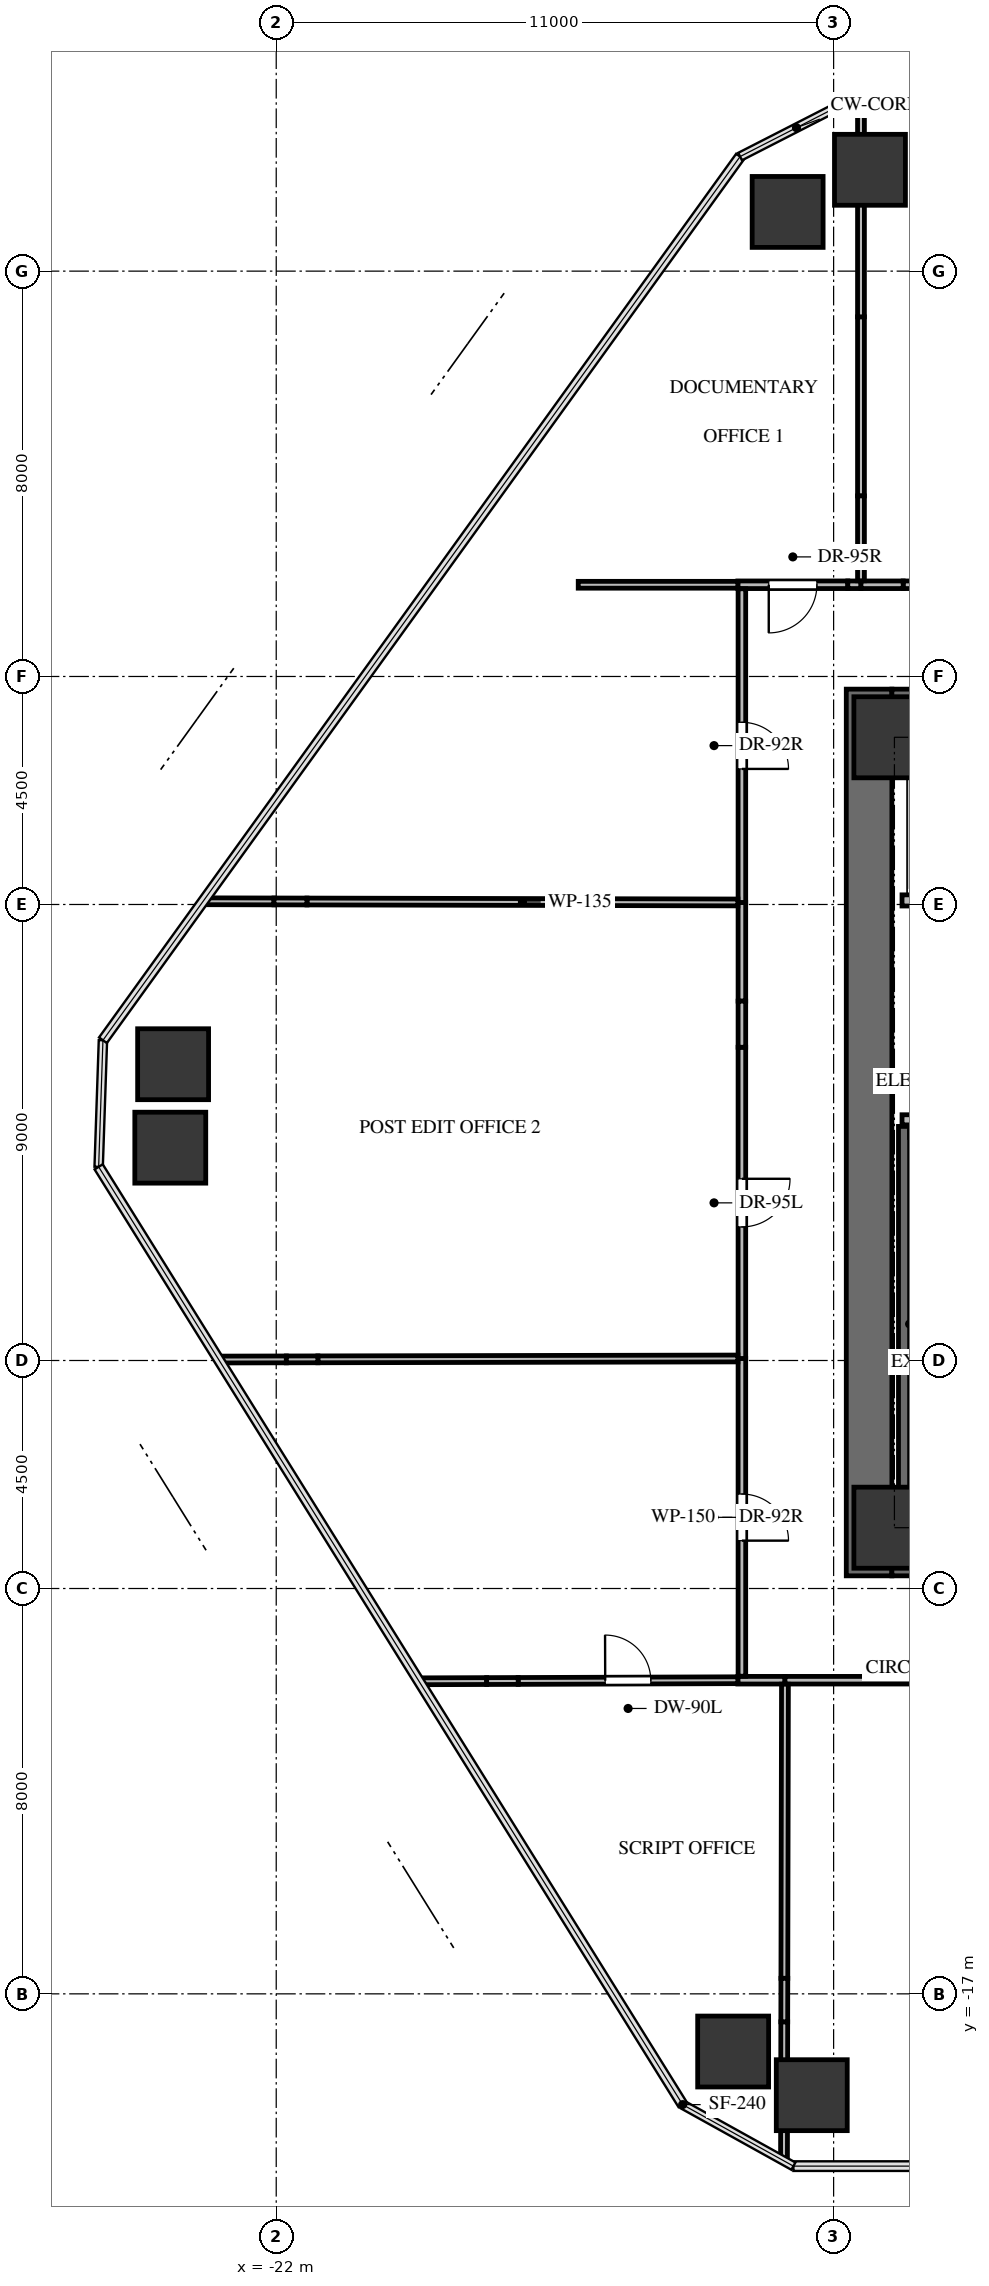
"""IFC4 building model, lengths in metres.
Left out: names, types, materials, properties, quantities, classifications, styles, units other than length and angle.
Written with IfcOpenShell. Run it as: python <this file> out.ifc"""

import sys

from ifc_helpers import new_model, si_unit, direction, frame, frame_2d, origin, origin_2d, place, context, subcontext, project, spatial, rectangle, extrude, source, transform, mapped, element, fill, save


model = new_model("IFC4")
c1 = context("Model", 3, precision=1e-05, world=origin(), true_north=direction((0.0, 1.0)))
c2 = subcontext(c1, "Body", "Model", "MODEL_VIEW")
j1 = project(units=[si_unit("LENGTHUNIT", "METRE"), si_unit("PLANEANGLEUNIT", "RADIAN")], contexts=[c1])
p1 = place(None, origin())
s1 = spatial("IfcSite", under=j1, at=p1, CompositionType="ELEMENT")
p2 = place(p1, origin())
s2 = spatial("IfcBuilding", under=s1, at=p2, CompositionType="ELEMENT")
p3 = place(p2, frame((0.0, 0.0, 75.3)))
s3 = spatial("IfcBuildingStorey", under=s2, at=p3, CompositionType="ELEMENT", Elevation=75.3)
p4 = place(p3, frame((-10.3, -8.75, 0.0), z_axis=(0.0, 0.0, 1.0), x_axis=(0.0, 1.0, 0.0)))
e1 = element("IfcWall", 1, at=p4, inside=s3, PredefinedType="SHEAR", context=c2, shape_type="SweptSolid", body=[
    extrude(rectangle(XDim=17.5, YDim=0.9, at=frame_2d((8.75, 0.0))), origin(), (0.0, 0.0, 1.0), 3.0),
])
p5 = place(p3, frame((-9.85, -8.3, 0.0), z_axis=(0.0, 0.0, 1.0), x_axis=(1.0, 0.0, 0.0)))
e2 = element("IfcWall", 2, at=p5, inside=s3, PredefinedType="SHEAR", context=c2, shape_type="SweptSolid", body=[
    extrude(rectangle(XDim=7.75, YDim=0.9, at=frame_2d((3.875, 0.0))), origin(), (0.0, 0.0, 1.0), 3.0),
])
p6 = place(p3, frame((-9.85, 8.3, 0.0), z_axis=(0.0, 0.0, 1.0), x_axis=(1.0, 0.0, 0.0)))
e3 = element("IfcWall", 3, at=p6, inside=s3, PredefinedType="SHEAR", context=c2, shape_type="SweptSolid", body=[
    extrude(rectangle(XDim=19.7, YDim=0.9, at=frame_2d((9.85, 0.0))), origin(), (0.0, 0.0, 1.0), 3.0),
])
p7 = place(p3, frame((-9.61, 0.12, -0.24), z_axis=(0.0, 0.0, 1.0), x_axis=(0.0, -1.0, 0.0)))
e4 = element("IfcWall", 4, at=p7, inside=s3, PredefinedType="SHEAR", context=c2, shape_type="SweptSolid", body=[
    extrude(rectangle(XDim=7.89, YDim=0.22, at=frame_2d((3.945, 0.0))), origin(), (0.0, 0.0, 1.0), 3.0),
])
m1 = source(origin(), c2, "Body", "SweptSolid", [
    extrude(rectangle(XDim=1.6, YDim=1.6, at=origin_2d()), origin(), (0.0, 0.0, 1.0), 3.0),
])
for number, where, z_axis, x_axis in (
    (5, (-9.8, -7.8, -0.24), (0.0, 0.0, 1.0), (1.0, 0.0, 0.0)),
    (6, (-9.8, 7.8, -0.24), (0.0, 0.0, 1.0), (1.0, 0.0, 0.0)),
):
    element("IfcColumn", number, at=place(p3, frame(where, z_axis=z_axis, x_axis=x_axis)), inside=s3, PredefinedType="COLUMN", context=c2, shape_type="MappedRepresentation", body=[
        mapped(m1, transform((0.0, 0.0, 0.0), x_axis=(1.0, 0.0, 0.0), y_axis=(0.0, 1.0, 0.0), z_axis=(0.0, 0.0, 1.0), scale=1.0)),
    ])
m2 = source(origin(), c2, "Body", "SweptSolid", [
    extrude(rectangle(XDim=1.4, YDim=1.4, at=origin_2d()), origin(), (0.0, 0.0, 1.0), 3.0),
])
for number, where, z_axis, x_axis in (
    (7, (-12.983, -18.138, -0.24), (0.0, 0.0, 1.0), (1.0, 0.0, 0.0)),
    (8, (-24.091, -0.3, -0.24), (0.0, 0.0, 1.0), (1.0, 0.0, 0.0)),
    (9, (-24.035, 1.347, -0.24), (0.0, 0.0, 1.0), (1.0, 0.0, 0.0)),
    (10, (-11.907, 18.168, -0.24), (0.0, 0.0, 1.0), (1.0, 0.0, 0.0)),
    (11, (-10.283, 19.0, -0.24), (0.0, 0.0, 1.0), (1.0, 0.0, 0.0)),
    (12, (-11.431, -19.0, -0.24), (0.0, 0.0, 1.0), (1.0, 0.0, 0.0)),
):
    element("IfcColumn", number, at=place(p3, frame(where, z_axis=z_axis, x_axis=x_axis)), inside=s3, PredefinedType="COLUMN", context=c2, shape_type="MappedRepresentation", body=[
        mapped(m2, transform((0.0, 0.0, 0.0), x_axis=(1.0, 0.0, 0.0), y_axis=(0.0, 1.0, 0.0), z_axis=(0.0, 0.0, 1.0), scale=1.0)),
    ])
p8 = place(p3, frame((-9.65, 4.58, 0.0), z_axis=(0.0, 0.0, 1.0), x_axis=(1.0, 0.0, 0.0)))
e13 = element("IfcWall", 13, at=p8, inside=s3, PredefinedType="SOLIDWALL", context=c2, shape_type="SweptSolid", body=[
    extrude(rectangle(XDim=4.175, YDim=0.22, at=frame_2d((2.087, 0.0))), origin(), (0.0, 0.0, 1.0), 2.745),
])
p9 = place(p8, frame((0.4, 0.0, 0.0)))
e14 = element("IfcOpeningElement", 14, at=p9, cuts=e13, PredefinedType="OPENING", context=c2, shape_type="SweptSolid", body=[
    extrude(rectangle(XDim=1.2, YDim=2.15, at=frame_2d((0.6, 1.075))), frame((0.0, 0.12, 0.0), z_axis=(0.0, -1.0, 0.0), x_axis=(1.0, 0.0, 0.0)), (0.0, 0.0, 1.0), 0.24),
])
p10 = place(p8, frame((2.4, 0.0, 0.0)))
e15 = element("IfcOpeningElement", 15, at=p10, cuts=e13, PredefinedType="OPENING", context=c2, shape_type="SweptSolid", body=[
    extrude(rectangle(XDim=1.2, YDim=2.15, at=frame_2d((0.6, 1.075))), frame((0.0, 0.12, 0.0), z_axis=(0.0, -1.0, 0.0), x_axis=(1.0, 0.0, 0.0)), (0.0, 0.0, 1.0), 0.24),
])
p11 = place(p3, frame((-9.65, 0.25, 0.0), z_axis=(0.0, 0.0, 1.0), x_axis=(1.0, 0.0, 0.0)))
e16 = element("IfcWall", 16, at=p11, inside=s3, PredefinedType="SOLIDWALL", context=c2, shape_type="SweptSolid", body=[
    extrude(rectangle(XDim=4.27, YDim=0.2, at=frame_2d((2.135, 0.0))), origin(), (0.0, 0.0, 1.0), 2.745),
])
p12 = place(p3, frame((-10.72, 10.81, 0.0), z_axis=(0.0, 0.0, 1.0), x_axis=(-1.0, 0.0, 0.0)))
e17 = element("IfcWall", 17, at=p12, inside=s3, PredefinedType="PARTITIONING", context=c2, shape_type="SweptSolid", body=[
    extrude(rectangle(XDim=2.17, YDim=0.15, at=frame_2d((1.085, 0.0))), origin(), (0.0, 0.0, 1.0), 2.745),
])
p13 = place(p12, frame((0.61, 0.0, 0.0)))
e18 = element("IfcOpeningElement", 18, at=p13, cuts=e17, PredefinedType="OPENING", context=c2, shape_type="SweptSolid", body=[
    extrude(rectangle(XDim=0.95, YDim=2.1, at=frame_2d((0.475, 1.05))), frame((0.0, 0.085, 0.0), z_axis=(0.0, -1.0, 0.0), x_axis=(1.0, 0.0, 0.0)), (0.0, 0.0, 1.0), 0.17),
])
p14 = place(p3, frame((-10.46, 10.81, 0.0), z_axis=(0.0, 0.0, 1.0), x_axis=(-1.0, 0.0, 0.0)))
e19 = element("IfcWall", 19, at=p14, inside=s3, PredefinedType="PARTITIONING", context=c2, shape_type="SweptSolid", body=[
    extrude(rectangle(XDim=0.26, YDim=0.15, at=frame_2d((0.13, 0.0))), origin(), (0.0, 0.0, 1.0), 1.83),
])
p15 = place(p3, frame((-4.96, 10.81, 0.0), z_axis=(0.0, 0.0, 1.0), x_axis=(-1.0, 0.0, 0.0)))
e20 = element("IfcWall", 20, at=p15, inside=s3, PredefinedType="PARTITIONING", context=c2, shape_type="SweptSolid", body=[
    extrude(rectangle(XDim=4.667, YDim=0.15, at=frame_2d((2.334, 0.0))), origin(), (0.0, 0.0, 1.0), 2.298),
])
p16 = place(p15, frame((1.874, 0.0, 0.0)))
e21 = element("IfcOpeningElement", 21, at=p16, cuts=e20, PredefinedType="OPENING", context=c2, shape_type="SweptSolid", body=[
    extrude(rectangle(XDim=0.92, YDim=2.1, at=frame_2d((0.46, 1.05))), frame((0.0, 0.085, 0.0), z_axis=(0.0, -1.0, 0.0), x_axis=(1.0, 0.0, 0.0)), (0.0, 0.0, 1.0), 0.17),
])
p17 = place(p3, frame((-9.627, 10.81, 0.0), z_axis=(0.0, 0.0, 1.0), x_axis=(-1.0, 0.0, 0.0)))
e22 = element("IfcWall", 22, at=p17, inside=s3, PredefinedType="PARTITIONING", context=c2, shape_type="SweptSolid", body=[
    extrude(rectangle(XDim=0.833, YDim=0.15, at=frame_2d((0.416, 0.0))), origin(), (0.0, 0.0, 1.0), 1.83),
])
p18 = place(p3, frame((-12.89, -10.81, 0.0), z_axis=(0.0, 0.0, 1.0), x_axis=(1.0, 0.0, 0.0)))
e23 = element("IfcWall", 23, at=p18, inside=s3, PredefinedType="PARTITIONING", context=c2, shape_type="SweptSolid", body=[
    extrude(rectangle(XDim=0.93, YDim=0.15, at=frame_2d((0.465, 0.0))), origin(), (0.0, 0.0, 1.0), 2.745),
])
p19 = place(p3, frame((-11.96, -10.81, 0.0), z_axis=(0.0, 0.0, 1.0), x_axis=(1.0, 0.0, 0.0)))
e24 = element("IfcWall", 24, at=p19, inside=s3, PredefinedType="PARTITIONING", context=c2, shape_type="SweptSolid", body=[
    extrude(rectangle(XDim=5.838, YDim=0.15, at=frame_2d((2.919, 0.0))), origin(), (0.0, 0.0, 1.0), 1.83),
])
p20 = place(p3, frame((-12.81, -4.46, 0.0), z_axis=(0.0, 0.0, 1.0), x_axis=(0.0, -1.0, 0.0)))
e25 = element("IfcWall", 25, at=p20, inside=s3, PredefinedType="PARTITIONING", context=c2, shape_type="SweptSolid", body=[
    extrude(rectangle(XDim=6.271, YDim=0.15, at=frame_2d((3.135, 0.0))), origin(), (0.0, 0.0, 1.0), 2.745),
])
p21 = place(p20, frame((2.676, 0.0, 0.0)))
e26 = element("IfcOpeningElement", 26, at=p21, cuts=e25, PredefinedType="OPENING", context=c2, shape_type="SweptSolid", body=[
    extrude(rectangle(XDim=0.92, YDim=2.1, at=frame_2d((0.46, 1.05))), frame((0.0, 0.085, 0.0), z_axis=(0.0, -1.0, 0.0), x_axis=(1.0, 0.0, 0.0)), (0.0, 0.0, 1.0), 0.17),
])
p22 = place(p3, frame((-12.81, 4.54, 0.0), z_axis=(0.0, 0.0, 1.0), x_axis=(0.0, -1.0, 0.0)))
e27 = element("IfcWall", 27, at=p22, inside=s3, PredefinedType="PARTITIONING", context=c2, shape_type="SweptSolid", body=[
    extrude(rectangle(XDim=1.948, YDim=0.15, at=frame_2d((0.974, 0.0))), origin(), (0.0, 0.0, 1.0), 2.745),
])
p23 = place(p3, frame((-12.81, 1.682, 0.0), z_axis=(0.0, 0.0, 1.0), x_axis=(0.0, -1.0, 0.0)))
e28 = element("IfcWall", 28, at=p23, inside=s3, PredefinedType="PARTITIONING", context=c2, shape_type="SweptSolid", body=[
    extrude(rectangle(XDim=6.142, YDim=0.15, at=frame_2d((3.071, 0.0))), origin(), (0.0, 0.0, 1.0), 2.745),
])
p24 = place(p23, frame((2.596, 0.0, 0.0)))
e29 = element("IfcOpeningElement", 29, at=p24, cuts=e28, PredefinedType="OPENING", context=c2, shape_type="SweptSolid", body=[
    extrude(rectangle(XDim=0.95, YDim=2.1, at=frame_2d((0.475, 1.05))), frame((0.0, 0.085, 0.0), z_axis=(0.0, -1.0, 0.0), x_axis=(1.0, 0.0, 0.0)), (0.0, 0.0, 1.0), 0.17),
])
p25 = place(p3, frame((-12.81, 2.592, 0.0), z_axis=(0.0, 0.0, 1.0), x_axis=(0.0, -1.0, 0.0)))
e30 = element("IfcWall", 30, at=p25, inside=s3, PredefinedType="PARTITIONING", context=c2, shape_type="SweptSolid", body=[
    extrude(rectangle(XDim=0.91, YDim=0.15, at=frame_2d((0.455, 0.0))), origin(), (0.0, 0.0, 1.0), 1.83),
])
p26 = place(p3, frame((-12.81, 10.731, 0.0), z_axis=(0.0, 0.0, 1.0), x_axis=(0.0, -1.0, 0.0)))
e31 = element("IfcWall", 31, at=p26, inside=s3, PredefinedType="PARTITIONING", context=c2, shape_type="SweptSolid", body=[
    extrude(rectangle(XDim=6.191, YDim=0.15, at=frame_2d((3.095, 0.0))), origin(), (0.0, 0.0, 1.0), 2.745),
])
p27 = place(p26, frame((2.635, 0.0, 0.0)))
e32 = element("IfcOpeningElement", 32, at=p27, cuts=e31, PredefinedType="OPENING", context=c2, shape_type="SweptSolid", body=[
    extrude(rectangle(XDim=0.92, YDim=2.1, at=frame_2d((0.46, 1.05))), frame((0.0, 0.085, 0.0), z_axis=(0.0, -1.0, 0.0), x_axis=(1.0, 0.0, 0.0)), (0.0, 0.0, 1.0), 0.17),
])
p28 = place(p3, frame((-10.46, 16.098, 0.0), z_axis=(0.0, 0.0, 1.0), x_axis=(0.0, -1.0, 0.0)))
e33 = element("IfcWall", 33, at=p28, inside=s3, PredefinedType="PARTITIONING", context=c2, shape_type="SweptSolid", body=[
    extrude(rectangle(XDim=3.535, YDim=0.135, at=frame_2d((1.768, 0.0))), origin(), (0.0, 0.0, 1.0), 1.83),
])
p29 = place(p3, frame((-10.46, 20.4, 0.0), z_axis=(0.0, 0.0, 1.0), x_axis=(0.0, -1.0, 0.0)))
e34 = element("IfcWall", 34, at=p29, inside=s3, PredefinedType="PARTITIONING", context=c2, shape_type="SweptSolid", body=[
    extrude(rectangle(XDim=4.302, YDim=0.135, at=frame_2d((2.151, 0.0))), origin(), (0.0, 0.0, 1.0), 1.577),
])
p30 = place(p3, frame((-10.46, 12.563, 0.0), z_axis=(0.0, 0.0, 1.0), x_axis=(0.0, -1.0, 0.0)))
e35 = element("IfcWall", 35, at=p30, inside=s3, PredefinedType="PARTITIONING", context=c2, shape_type="SweptSolid", body=[
    extrude(rectangle(XDim=1.675, YDim=0.135, at=frame_2d((0.837, 0.0))), origin(), (0.0, 0.0, 1.0), 1.83),
])
p31 = place(p3, frame((-12.89, 10.81, 0.0), z_axis=(0.0, 0.0, 1.0), x_axis=(-1.0, 0.0, 0.0)))
e36 = element("IfcWall", 36, at=p31, inside=s3, PredefinedType="PARTITIONING", context=c2, shape_type="SweptSolid", body=[
    extrude(rectangle(XDim=3.15, YDim=0.135, at=frame_2d((1.575, 0.0))), origin(), (0.0, 0.0, 1.0), 2.745),
])
p32 = place(p3, frame((-11.96, -10.889, 0.0), z_axis=(0.0, 0.0, 1.0), x_axis=(-0.002018838416, -0.999997962144, 0.0)))
e37 = element("IfcWall", 37, at=p32, inside=s3, PredefinedType="PARTITIONING", context=c2, shape_type="SweptSolid", body=[
    extrude(rectangle(XDim=5.805, YDim=0.135, at=frame_2d((2.902, 0.0))), origin(), (0.0, 0.0, 1.0), 1.83),
])
p33 = place(p3, frame((-11.974, -17.552, 0.0), z_axis=(0.0, 0.0, 1.0), x_axis=(-0.002027218539, -0.99999794519, 0.0)))
e38 = element("IfcWall", 38, at=p33, inside=s3, PredefinedType="PARTITIONING", context=c2, shape_type="SweptSolid", body=[
    extrude(rectangle(XDim=0.843, YDim=0.135, at=frame_2d((0.421, 0.0))), origin(), (0.0, 0.0, 1.0), 1.83),
])
p34 = place(p3, frame((-11.977, -19.0, 0.0), z_axis=(0.0, 0.0, 1.0), x_axis=(-0.002069999329, -0.999997857549, 0.0)))
e39 = element("IfcWall", 39, at=p34, inside=s3, PredefinedType="PARTITIONING", context=c2, shape_type="SweptSolid", body=[
    extrude(rectangle(XDim=1.297, YDim=0.135, at=frame_2d((0.649, 0.0))), origin(), (0.0, 0.0, 1.0), 2.745),
])
p35 = place(p3, frame((-11.972, -16.694, 0.0), z_axis=(0.0, 0.0, 1.0), x_axis=(-0.002275306966, -0.999997411486, 0.0)))
e40 = element("IfcWall", 40, at=p35, inside=s3, PredefinedType="PARTITIONING", context=c2, shape_type="SweptSolid", body=[
    extrude(rectangle(XDim=0.858, YDim=0.135, at=frame_2d((0.429, 0.0))), origin(), (0.0, 0.0, 1.0), 1.83),
])
p36 = place(p3, frame((-11.976, -18.395, 0.0), z_axis=(0.0, 0.0, 1.0), x_axis=(-0.002019381989, -0.999997961046, 0.0)))
e41 = element("IfcWall", 41, at=p36, inside=s3, PredefinedType="PARTITIONING", context=c2, shape_type="SweptSolid", body=[
    extrude(rectangle(XDim=0.604, YDim=0.135, at=frame_2d((0.302, 0.0))), origin(), (0.0, 0.0, 1.0), 2.08),
])
p37 = place(p3, frame((-19.182, -10.831, 0.0), z_axis=(0.0, 0.0, 1.0), x_axis=(0.999994579825, 0.00329246432, 0.0)))
e42 = element("IfcWall", 42, at=p37, inside=s3, PredefinedType="PARTITIONING", context=c2, shape_type="SweptSolid", body=[
    extrude(rectangle(XDim=1.335, YDim=0.135, at=frame_2d((0.667, 0.0))), origin(), (0.0, 0.0, 1.0), 2.745),
])
p38 = place(p3, frame((-17.225, -10.825, 0.0), z_axis=(0.0, 0.0, 1.0), x_axis=(0.999994480721, 0.003322427884, 0.0)))
e43 = element("IfcWall", 43, at=p38, inside=s3, PredefinedType="PARTITIONING", context=c2, shape_type="SweptSolid", body=[
    extrude(rectangle(XDim=4.335, YDim=0.135, at=frame_2d((2.168, 0.0))), origin(), (0.0, 0.0, 1.0), 2.745),
])
p39 = place(p38, frame((1.718, 0.0, 0.0)))
e44 = element("IfcOpeningElement", 44, at=p39, cuts=e43, PredefinedType="OPENING", context=c2, shape_type="SweptSolid", body=[
    extrude(rectangle(XDim=0.9, YDim=2.05, at=frame_2d((0.45, 1.025))), frame((0.0, 0.078, 0.0), z_axis=(0.0, -1.0, 0.0), x_axis=(1.0, 0.0, 0.0)), (0.0, 0.0, 1.0), 0.155),
])
p40 = place(p3, frame((-17.847, -10.827, 0.0), z_axis=(0.0, 0.0, 1.0), x_axis=(0.999993761903, 0.00353216007, 0.0)))
e45 = element("IfcWall", 45, at=p40, inside=s3, PredefinedType="PARTITIONING", context=c2, shape_type="SweptSolid", body=[
    extrude(rectangle(XDim=0.622, YDim=0.135, at=frame_2d((0.311, 0.0))), origin(), (0.0, 0.0, 1.0), 2.08),
])
p41 = place(p3, frame((-23.136, -4.481, 0.0), z_axis=(0.0, 0.0, 1.0), x_axis=(0.999997979486, 0.002010229856, 0.0)))
e46 = element("IfcWall", 46, at=p41, inside=s3, PredefinedType="PARTITIONING", context=c2, shape_type="SweptSolid", body=[
    extrude(rectangle(XDim=1.336, YDim=0.135, at=frame_2d((0.668, 0.0))), origin(), (0.0, 0.0, 1.0), 2.745),
])
p42 = place(p3, frame((-21.178, -4.477, 0.0), z_axis=(0.0, 0.0, 1.0), x_axis=(0.999997934924, 0.00203227667, 0.0)))
e47 = element("IfcWall", 47, at=p42, inside=s3, PredefinedType="PARTITIONING", context=c2, shape_type="SweptSolid", body=[
    extrude(rectangle(XDim=8.289, YDim=0.135, at=frame_2d((4.145, 0.0))), origin(), (0.0, 0.0, 1.0), 2.745),
])
p43 = place(p3, frame((-21.8, -4.479, 0.0), z_axis=(0.0, 0.0, 1.0), x_axis=(0.999997229673, 0.00235385774, 0.0)))
e48 = element("IfcWall", 48, at=p43, inside=s3, PredefinedType="PARTITIONING", context=c2, shape_type="SweptSolid", body=[
    extrude(rectangle(XDim=0.622, YDim=0.135, at=frame_2d((0.311, 0.0))), origin(), (0.0, 0.0, 1.0), 2.08),
])
p44 = place(p3, frame((-23.442, 4.563, 0.0), z_axis=(0.0, 0.0, 1.0), x_axis=(0.999997421875, -0.002270736504, 0.0)))
e49 = element("IfcWall", 49, at=p44, inside=s3, PredefinedType="PARTITIONING", context=c2, shape_type="SweptSolid", body=[
    extrude(rectangle(XDim=1.398, YDim=0.135, at=frame_2d((0.699, 0.0))), origin(), (0.0, 0.0, 1.0), 2.745),
])
p45 = place(p3, frame((-21.393, 4.559, 0.0), z_axis=(0.0, 0.0, 1.0), x_axis=(0.999997619934, -0.002181771233, 0.0)))
e50 = element("IfcWall", 50, at=p45, inside=s3, PredefinedType="PARTITIONING", context=c2, shape_type="SweptSolid", body=[
    extrude(rectangle(XDim=8.504, YDim=0.135, at=frame_2d((4.252, 0.0))), origin(), (0.0, 0.0, 1.0), 2.745),
])
p46 = place(p3, frame((-22.045, 4.56, 0.0), z_axis=(0.0, 0.0, 1.0), x_axis=(0.999997471289, -0.002248869875, 0.0)))
e51 = element("IfcWall", 51, at=p46, inside=s3, PredefinedType="PARTITIONING", context=c2, shape_type="SweptSolid", body=[
    extrude(rectangle(XDim=0.651, YDim=0.135, at=frame_2d((0.326, 0.0))), origin(), (0.0, 0.0, 1.0), 2.08),
])
m3 = source(origin(), c2, "Body", "SweptSolid", [
    extrude(rectangle(XDim=0.95, YDim=2.1, at=frame_2d((0.475, 1.05))), frame((0.0, 0.025, 0.0), z_axis=(0.0, -1.0, 0.0), x_axis=(1.0, 0.0, 0.0)), (0.0, 0.0, 1.0), 0.05),
])
p47 = place(p13, origin())
e52 = element("IfcDoor", 52, at=p47, inside=s3, OperationType="SINGLE_SWING_RIGHT", PredefinedType="DOOR", context=c2, shape_type="MappedRepresentation", body=[
    mapped(m3, transform((0.0, 0.0, 0.0), x_axis=(1.0, 0.0, 0.0), y_axis=(0.0, 1.0, 0.0), z_axis=(0.0, 0.0, 1.0), scale=1.0)),
])
fill(e18, e52)
m4 = source(origin(), c2, "Body", "SweptSolid", [
    extrude(rectangle(XDim=0.92, YDim=2.1, at=frame_2d((0.46, 1.05))), frame((0.0, 0.025, 0.0), z_axis=(0.0, -1.0, 0.0), x_axis=(1.0, 0.0, 0.0)), (0.0, 0.0, 1.0), 0.05),
])
p48 = place(p21, origin())
e53 = element("IfcDoor", 53, at=p48, inside=s3, OperationType="SINGLE_SWING_RIGHT", PredefinedType="DOOR", context=c2, shape_type="MappedRepresentation", body=[
    mapped(m4, transform((0.0, 0.0, 0.0), x_axis=(1.0, 0.0, 0.0), y_axis=(0.0, 1.0, 0.0), z_axis=(0.0, 0.0, 1.0), scale=1.0)),
])
fill(e26, e53)
m5 = source(origin(), c2, "Body", "SweptSolid", [
    extrude(rectangle(XDim=0.95, YDim=2.1, at=frame_2d((0.475, 1.05))), frame((0.0, 0.025, 0.0), z_axis=(0.0, -1.0, 0.0), x_axis=(1.0, 0.0, 0.0)), (0.0, 0.0, 1.0), 0.05),
])
p49 = place(p24, origin())
e54 = element("IfcDoor", 54, at=p49, inside=s3, OperationType="SINGLE_SWING_LEFT", PredefinedType="DOOR", context=c2, shape_type="MappedRepresentation", body=[
    mapped(m5, transform((0.0, 0.0, 0.0), x_axis=(1.0, 0.0, 0.0), y_axis=(0.0, 1.0, 0.0), z_axis=(0.0, 0.0, 1.0), scale=1.0)),
])
fill(e29, e54)
p50 = place(p27, origin())
e55 = element("IfcDoor", 55, at=p50, inside=s3, OperationType="SINGLE_SWING_RIGHT", PredefinedType="DOOR", context=c2, shape_type="MappedRepresentation", body=[
    mapped(m4, transform((0.0, 0.0, 0.0), x_axis=(1.0, 0.0, 0.0), y_axis=(0.0, 1.0, 0.0), z_axis=(0.0, 0.0, 1.0), scale=1.0)),
])
fill(e32, e55)
m6 = source(origin(), c2, "Body", "SweptSolid", [
    extrude(rectangle(XDim=0.9, YDim=2.05, at=frame_2d((0.45, 1.025))), frame((0.0, 0.025, 0.0), z_axis=(0.0, -1.0, 0.0), x_axis=(1.0, 0.0, 0.0)), (0.0, 0.0, 1.0), 0.05),
])
p51 = place(p39, origin())
e56 = element("IfcDoor", 56, at=p51, inside=s3, OperationType="SINGLE_SWING_LEFT", PredefinedType="DOOR", context=c2, shape_type="MappedRepresentation", body=[
    mapped(m6, transform((0.0, 0.0, 0.0), x_axis=(1.0, 0.0, 0.0), y_axis=(0.0, 1.0, 0.0), z_axis=(0.0, 0.0, 1.0), scale=1.0)),
])
fill(e44, e56)
save(model, sys.argv[1])
